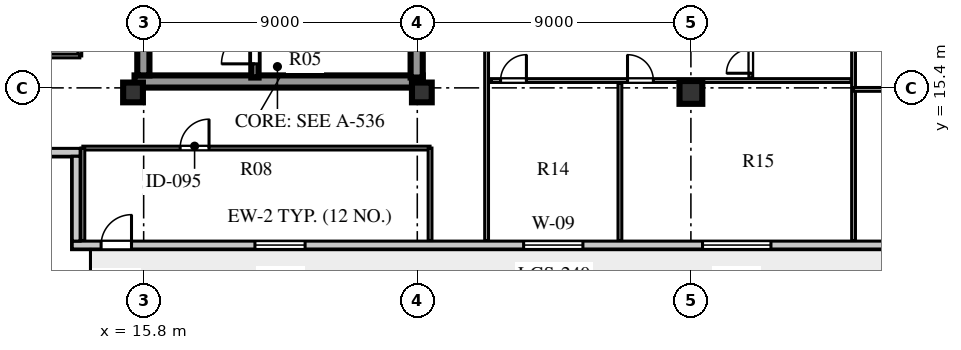
"""IFC4 building model, lengths in metres.
Left out: names, types, materials, properties, quantities, classifications, styles, units other than length and angle.
Written with IfcOpenShell. Run it as: python <this file> out.ifc"""

import sys

from ifc_helpers import new_model, si_unit, direction, frame, frame_2d, origin, origin_2d, place, context, subcontext, project, spatial, rectangle, extrude, element, fill, save


model = new_model("IFC4")
c1 = context("Model", 3, precision=1e-05, world=origin(), true_north=direction((0.0, 1.0)))
c2 = subcontext(c1, "Body", "Model", "MODEL_VIEW")
j1 = project(units=[si_unit("LENGTHUNIT", "METRE"), si_unit("PLANEANGLEUNIT", "RADIAN")], contexts=[c1])
p1 = place(None, origin())
s1 = spatial("IfcSite", under=j1, at=p1, CompositionType="ELEMENT")
p2 = place(p1, origin())
s2 = spatial("IfcBuilding", under=s1, at=p2, CompositionType="ELEMENT")
p3 = place(p2, frame((0.0, 0.0, 280.4)))
s3 = spatial("IfcBuildingStorey", under=s2, at=p3, CompositionType="ELEMENT", Elevation=280.4)
p4 = place(p3, frame((15.5, 15.61, 0.0), z_axis=(0.0, 0.0, 1.0), x_axis=(1.0, 0.0, 0.0)))
e1 = element("IfcWall", 1, at=p4, inside=s3, PredefinedType="SHEAR", context=c2, shape_type="SweptSolid", body=[
    extrude(rectangle(XDim=9.48, YDim=0.4, at=frame_2d((4.74, 0.0))), origin(), (0.0, 0.0, 1.0), 3.66),
])
p5 = place(p3, frame((15.79, 15.81, 0.0), z_axis=(0.0, 0.0, 1.0), x_axis=(0.0, 1.0, 0.0)))
e2 = element("IfcWall", 2, at=p5, inside=s3, PredefinedType="SHEAR", context=c2, shape_type="SweptSolid", body=[
    extrude(rectangle(XDim=25.63, YDim=0.4, at=frame_2d((12.815, 0.0))), origin(), (0.0, 0.0, 1.0), 3.66),
])
p6 = place(p3, frame((24.78, 15.74, 0.0), z_axis=(0.0, 0.0, 1.0), x_axis=(0.0, 1.0, 0.0)))
e3 = element("IfcWall", 3, at=p6, inside=s3, PredefinedType="SHEAR", context=c2, shape_type="SweptSolid", body=[
    extrude(rectangle(XDim=25.76, YDim=0.4, at=frame_2d((12.88, 0.0))), origin(), (0.0, 0.0, 1.0), 3.66),
])
p7 = place(p6, frame((1.61, 0.0, 0.0)))
e4 = element("IfcOpeningElement", 4, at=p7, cuts=e3, PredefinedType="OPENING", context=c2, shape_type="SweptSolid", body=[
    extrude(rectangle(XDim=1.2, YDim=2.1, at=frame_2d((0.6, 1.05))), frame((0.0, 0.21, 0.0), z_axis=(0.0, -1.0, 0.0), x_axis=(1.0, 0.0, 0.0)), (0.0, 0.0, 1.0), 0.42),
])
p8 = place(p6, frame((6.78, 0.0, 0.0)))
e5 = element("IfcOpeningElement", 5, at=p8, cuts=e3, PredefinedType="OPENING", context=c2, shape_type="SweptSolid", body=[
    extrude(rectangle(XDim=0.85, YDim=2.06, at=frame_2d((0.425, 1.03))), frame((0.0, 0.21, 0.0), z_axis=(0.0, -1.0, 0.0), x_axis=(1.0, 0.0, 0.0)), (0.0, 0.0, 1.0), 0.42),
])
p9 = place(p6, frame((12.11, 0.0, 0.0)))
e6 = element("IfcOpeningElement", 6, at=p9, cuts=e3, PredefinedType="OPENING", context=c2, shape_type="SweptSolid", body=[
    extrude(rectangle(XDim=1.5, YDim=2.12, at=frame_2d((0.75, 1.06))), frame((0.0, 0.21, 0.0), z_axis=(0.0, -1.0, 0.0), x_axis=(1.0, 0.0, 0.0)), (0.0, 0.0, 1.0), 0.42),
])
p10 = place(p6, frame((20.11, 0.0, 0.0)))
e7 = element("IfcOpeningElement", 7, at=p10, cuts=e3, PredefinedType="OPENING", context=c2, shape_type="SweptSolid", body=[
    extrude(rectangle(XDim=1.2, YDim=2.12, at=frame_2d((0.6, 1.06))), frame((0.0, 0.21, 0.0), z_axis=(0.0, -1.0, 0.0), x_axis=(1.0, 0.0, 0.0)), (0.0, 0.0, 1.0), 0.42),
])
p11 = place(p6, frame((24.01, 0.0, 0.0)))
e8 = element("IfcOpeningElement", 8, at=p11, cuts=e3, PredefinedType="OPENING", context=c2, shape_type="SweptSolid", body=[
    extrude(rectangle(XDim=0.95, YDim=2.1, at=frame_2d((0.475, 1.05))), frame((0.0, 0.21, 0.0), z_axis=(0.0, -1.0, 0.0), x_axis=(1.0, 0.0, 0.0)), (0.0, 0.0, 1.0), 0.42),
])
for number, where, z_axis, x_axis in (
    (9, (15.45, 15.25, 0.0), (0.0, 0.0, 1.0), (1.0, 0.0, 0.0)),
    (10, (24.95, 15.25, 0.0), (0.0, 0.0, 1.0), (1.0, 0.0, 0.0)),
):
    element("IfcColumn", number, at=place(p3, frame(where, z_axis=z_axis, x_axis=x_axis)), inside=s3, PredefinedType="COLUMN", context=c2, shape_type="SweptSolid", body=[
        extrude(rectangle(XDim=0.65, YDim=0.65, at=origin_2d()), origin(), (0.0, 0.0, 1.0), 3.66),
    ])
p12 = place(p3, frame((33.8, 15.25, 0.0), z_axis=(0.0, 0.0, 1.0), x_axis=(1.0, 0.0, 0.0)))
e11 = element("IfcColumn", 11, at=p12, inside=s3, PredefinedType="COLUMN", context=c2, shape_type="SweptSolid", body=[
    extrude(rectangle(XDim=0.75, YDim=0.75, at=origin_2d()), origin(), (0.0, 0.0, 1.0), 3.66),
])
p13 = place(p3, frame((13.45, 10.23, 0.0), z_axis=(0.0, 0.0, 1.0), x_axis=(1.0, 0.0, 0.0)))
e12 = element("IfcWall", 12, at=p13, inside=s3, PredefinedType="SOLIDWALL", context=c2, shape_type="SweptSolid", body=[
    extrude(rectangle(XDim=31.7, YDim=0.26, at=frame_2d((15.85, 0.0))), origin(), (0.0, 0.0, 1.0), 3.66),
])
p14 = place(p13, frame((0.95, 0.0, 0.0)))
e13 = element("IfcOpeningElement", 13, at=p14, cuts=e12, PredefinedType="OPENING", context=c2, shape_type="SweptSolid", body=[
    extrude(rectangle(XDim=1.0, YDim=2.05, at=frame_2d((0.5, 1.025))), frame((0.0, 0.14, 0.0), z_axis=(0.0, -1.0, 0.0), x_axis=(1.0, 0.0, 0.0)), (0.0, 0.0, 1.0), 0.28),
])
p15 = place(p13, frame((6.01, 0.0, 0.8)))
e14 = element("IfcOpeningElement", 14, at=p15, cuts=e12, PredefinedType="OPENING", context=c2, shape_type="SweptSolid", body=[
    extrude(rectangle(XDim=1.65, YDim=1.95, at=frame_2d((0.825, 0.975))), frame((0.0, 0.14, 0.0), z_axis=(0.0, -1.0, 0.0), x_axis=(1.0, 0.0, 0.0)), (0.0, 0.0, 1.0), 0.28),
])
p16 = place(p13, frame((14.848, 0.0, 0.8)))
e15 = element("IfcOpeningElement", 15, at=p16, cuts=e12, PredefinedType="OPENING", context=c2, shape_type="SweptSolid", body=[
    extrude(rectangle(XDim=1.95, YDim=2.0, at=frame_2d((0.975, 1.0))), frame((0.0, 0.14, 0.0), z_axis=(0.0, -1.0, 0.0), x_axis=(1.0, 0.0, 0.0)), (0.0, 0.0, 1.0), 0.28),
])
p17 = place(p13, frame((20.733, 0.0, 0.8)))
e16 = element("IfcOpeningElement", 16, at=p17, cuts=e12, PredefinedType="OPENING", context=c2, shape_type="SweptSolid", body=[
    extrude(rectangle(XDim=2.25, YDim=2.0, at=frame_2d((1.125, 1.0))), frame((0.0, 0.14, 0.0), z_axis=(0.0, -1.0, 0.0), x_axis=(1.0, 0.0, 0.0)), (0.0, 0.0, 1.0), 0.28),
])
p18 = place(p13, frame((27.745, 0.0, 0.8)))
e17 = element("IfcOpeningElement", 17, at=p18, cuts=e12, PredefinedType="OPENING", context=c2, shape_type="SweptSolid", body=[
    extrude(rectangle(XDim=1.8, YDim=2.0, at=frame_2d((0.9, 1.0))), frame((0.0, 0.14, 0.0), z_axis=(0.0, -1.0, 0.0), x_axis=(1.0, 0.0, 0.0)), (0.0, 0.0, 1.0), 0.28),
])
p19 = place(p3, frame((10.4, 13.28, 0.0), z_axis=(0.0, 0.0, 1.0), x_axis=(1.0, 0.0, 0.0)))
e18 = element("IfcWall", 18, at=p19, inside=s3, PredefinedType="SOLIDWALL", context=c2, shape_type="SweptSolid", body=[
    extrude(rectangle(XDim=3.31, YDim=0.26, at=frame_2d((1.655, 0.0))), origin(), (0.0, 0.0, 1.0), 3.66),
])
p20 = place(p3, frame((13.58, 13.15, 0.0), z_axis=(0.0, 0.0, 1.0), x_axis=(0.0, -1.0, 0.0)))
e19 = element("IfcWall", 19, at=p20, inside=s3, PredefinedType="SOLIDWALL", context=c2, shape_type="SweptSolid", body=[
    extrude(rectangle(XDim=2.79, YDim=0.26, at=frame_2d((1.395, 0.0))), origin(), (0.0, 0.0, 1.0), 3.66),
])
p21 = place(p3, frame((19.46, 15.74, 0.0), z_axis=(0.0, 0.0, 1.0), x_axis=(0.0, 1.0, 0.0)))
e20 = element("IfcWall", 20, at=p21, inside=s3, PredefinedType="SHEAR", context=c2, shape_type="SweptSolid", body=[
    extrude(rectangle(XDim=8.2, YDim=0.24, at=frame_2d((4.1, 0.0))), origin(), (0.0, 0.0, 1.0), 3.9),
])
p22 = place(p21, frame((0.45, 0.0, 0.0)))
e21 = element("IfcOpeningElement", 21, at=p22, cuts=e20, PredefinedType="OPENING", context=c2, shape_type="SweptSolid", body=[
    extrude(rectangle(XDim=1.1, YDim=2.1, at=frame_2d((0.55, 1.05))), frame((0.0, 0.13, 0.0), z_axis=(0.0, -1.0, 0.0), x_axis=(1.0, 0.0, 0.0)), (0.0, 0.0, 1.0), 0.26),
])
p23 = place(p3, frame((27.08, 10.38, 0.0), z_axis=(0.0, 0.0, 1.0), x_axis=(0.0, 1.0, 0.0)))
e22 = element("IfcWall", 22, at=p23, inside=s3, PredefinedType="PLUMBINGWALL", context=c2, shape_type="SweptSolid", body=[
    extrude(rectangle(XDim=11.04, YDim=0.125, at=frame_2d((5.52, 0.0))), origin(), (0.0, 0.0, 1.0), 3.66),
])
p24 = place(p3, frame((13.8, 13.42, 0.0), z_axis=(0.0, 0.0, 1.0), x_axis=(1.0, 0.0, 0.0)))
e23 = element("IfcWall", 23, at=p24, inside=s3, PredefinedType="PLUMBINGWALL", context=c2, shape_type="SweptSolid", body=[
    extrude(rectangle(XDim=11.42, YDim=0.125, at=frame_2d((5.71, 0.0))), origin(), (0.0, 0.0, 1.0), 3.66),
])
p25 = place(p24, frame((3.2, 0.0, 0.0)))
e24 = element("IfcOpeningElement", 24, at=p25, cuts=e23, PredefinedType="OPENING", context=c2, shape_type="SweptSolid", body=[
    extrude(rectangle(XDim=0.95, YDim=2.08, at=frame_2d((0.475, 1.04))), frame((0.0, 0.073, 0.0), z_axis=(0.0, -1.0, 0.0), x_axis=(1.0, 0.0, 0.0)), (0.0, 0.0, 1.0), 0.145),
])
p26 = place(p3, frame((13.8, 10.38, 0.0), z_axis=(0.0, 0.0, 1.0), x_axis=(0.0, 1.0, 0.0)))
e25 = element("IfcWall", 25, at=p26, inside=s3, PredefinedType="PLUMBINGWALL", context=c2, shape_type="SweptSolid", body=[
    extrude(rectangle(XDim=3.04, YDim=0.125, at=frame_2d((1.52, 0.0))), origin(), (0.0, 0.0, 1.0), 3.66),
])
p27 = place(p3, frame((25.22, 10.38, 0.0), z_axis=(0.0, 0.0, 1.0), x_axis=(0.0, 1.0, 0.0)))
e26 = element("IfcWall", 26, at=p27, inside=s3, PredefinedType="PLUMBINGWALL", context=c2, shape_type="SweptSolid", body=[
    extrude(rectangle(XDim=3.04, YDim=0.125, at=frame_2d((1.52, 0.0))), origin(), (0.0, 0.0, 1.0), 3.21),
])
p28 = place(p3, frame((13.7, 16.45, 0.0), z_axis=(0.0, 0.0, 1.0), x_axis=(0.0, 1.0, 0.0)))
e27 = element("IfcWall", 27, at=p28, inside=s3, PredefinedType="PLUMBINGWALL", context=c2, shape_type="SweptSolid", body=[
    extrude(rectangle(XDim=24.3, YDim=0.125, at=frame_2d((12.15, 0.0))), origin(), (0.0, 0.0, 1.0), 3.66),
])
p29 = place(p28, frame((5.1, 0.0, 0.0)))
e28 = element("IfcOpeningElement", 28, at=p29, cuts=e27, PredefinedType="OPENING", context=c2, shape_type="SweptSolid", body=[
    extrude(rectangle(XDim=0.95, YDim=2.08, at=frame_2d((0.475, 1.04))), frame((0.0, 0.073, 0.0), z_axis=(0.0, -1.0, 0.0), x_axis=(1.0, 0.0, 0.0)), (0.0, 0.0, 1.0), 0.145),
])
p30 = place(p3, frame((10.68, 16.45, 0.0), z_axis=(0.0, 0.0, 1.0), x_axis=(1.0, 0.0, 0.0)))
e29 = element("IfcWall", 29, at=p30, inside=s3, PredefinedType="PLUMBINGWALL", context=c2, shape_type="SweptSolid", body=[
    extrude(rectangle(XDim=3.02, YDim=0.125, at=frame_2d((1.51, 0.0))), origin(), (0.0, 0.0, 1.0), 3.66),
])
p31 = place(p3, frame((39.15, 10.38, 0.0), z_axis=(0.0, 0.0, 1.0), x_axis=(0.0, 1.0, 0.0)))
e30 = element("IfcWall", 30, at=p31, inside=s3, PredefinedType="PLUMBINGWALL", context=c2, shape_type="SweptSolid", body=[
    extrude(rectangle(XDim=11.04, YDim=0.125, at=frame_2d((5.52, 0.0))), origin(), (0.0, 0.0, 1.0), 3.66),
])
p32 = place(p3, frame((27.24, 15.641, 0.0), z_axis=(0.0, 0.0, 1.0), x_axis=(1.0, 0.0, 0.0)))
e31 = element("IfcWall", 31, at=p32, inside=s3, PredefinedType="PLUMBINGWALL", context=c2, shape_type="SweptSolid", body=[
    extrude(rectangle(XDim=11.83, YDim=0.125, at=frame_2d((5.915, 0.0))), origin(), (0.0, 0.0, 1.0), 3.66),
])
p33 = place(p32, frame((0.3, 0.0, 0.0)))
e32 = element("IfcOpeningElement", 32, at=p33, cuts=e31, PredefinedType="OPENING", context=c2, shape_type="SweptSolid", body=[
    extrude(rectangle(XDim=0.85, YDim=2.08, at=frame_2d((0.425, 1.04))), frame((0.0, 0.073, 0.0), z_axis=(0.0, -1.0, 0.0), x_axis=(1.0, 0.0, 0.0)), (0.0, 0.0, 1.0), 0.145),
])
p34 = place(p32, frame((4.475, 0.0, 0.0)))
e33 = element("IfcOpeningElement", 33, at=p34, cuts=e31, PredefinedType="OPENING", context=c2, shape_type="SweptSolid", body=[
    extrude(rectangle(XDim=0.85, YDim=2.08, at=frame_2d((0.425, 1.04))), frame((0.0, 0.073, 0.0), z_axis=(0.0, -1.0, 0.0), x_axis=(1.0, 0.0, 0.0)), (0.0, 0.0, 1.0), 0.145),
])
p35 = place(p3, frame((35.77, 15.721, 0.0), z_axis=(0.0, 0.0, 1.0), x_axis=(0.0, 1.0, 0.0)))
e34 = element("IfcWall", 34, at=p35, inside=s3, PredefinedType="PLUMBINGWALL", context=c2, shape_type="SweptSolid", body=[
    extrude(rectangle(XDim=5.619, YDim=0.125, at=frame_2d((2.81, 0.0))), origin(), (0.0, 0.0, 1.0), 3.66),
])
p36 = place(p35, frame((0.16, 0.0, 0.0)))
e35 = element("IfcOpeningElement", 35, at=p36, cuts=e34, PredefinedType="OPENING", context=c2, shape_type="SweptSolid", body=[
    extrude(rectangle(XDim=0.8, YDim=2.05, at=frame_2d((0.4, 1.025))), frame((0.0, 0.073, 0.0), z_axis=(0.0, -1.0, 0.0), x_axis=(1.0, 0.0, 0.0)), (0.0, 0.0, 1.0), 0.145),
])
p37 = place(p35, frame((2.977, 0.0, 0.0)))
e36 = element("IfcOpeningElement", 36, at=p37, cuts=e34, PredefinedType="OPENING", context=c2, shape_type="SweptSolid", body=[
    extrude(rectangle(XDim=0.85, YDim=2.08, at=frame_2d((0.425, 1.04))), frame((0.0, 0.073, 0.0), z_axis=(0.0, -1.0, 0.0), x_axis=(1.0, 0.0, 0.0)), (0.0, 0.0, 1.0), 0.145),
])
p38 = place(p3, frame((31.465, 10.38, 0.0), z_axis=(0.0, 0.0, 1.0), x_axis=(0.0, 1.0, 0.0)))
e37 = element("IfcWall", 37, at=p38, inside=s3, PredefinedType="PLUMBINGWALL", context=c2, shape_type="SweptSolid", body=[
    extrude(rectangle(XDim=5.181, YDim=0.125, at=frame_2d((2.591, 0.0))), origin(), (0.0, 0.0, 1.0), 3.66),
])
p39 = place(p3, frame((39.15, 15.35, 0.0), z_axis=(0.0, 0.0, 1.0), x_axis=(1.0, 0.0, 0.0)))
e38 = element("IfcWall", 38, at=p39, inside=s3, PredefinedType="PLUMBINGWALL", context=c2, shape_type="SweptSolid", body=[
    extrude(rectangle(XDim=8.77, YDim=0.125, at=frame_2d((4.385, 0.0))), origin(), (0.0, 0.0, 1.0), 3.06),
])
p40 = place(p14, frame((1.0, 0.0, 0.0), z_axis=(0.0, 0.0, 1.0), x_axis=(-1.0, 0.0, 0.0)))
e39 = element("IfcDoor", 39, at=p40, inside=s3, OperationType="SINGLE_SWING_LEFT", PredefinedType="DOOR", context=c2, shape_type="SweptSolid", body=[
    extrude(rectangle(XDim=1.0, YDim=2.05, at=frame_2d((0.5, 1.025))), frame((0.0, 0.025, 0.0), z_axis=(0.0, -1.0, 0.0), x_axis=(1.0, 0.0, 0.0)), (0.0, 0.0, 1.0), 0.05),
])
fill(e13, e39)
p41 = place(p15, origin())
e40 = element("IfcWindow", 40, at=p41, inside=s3, PartitioningType="SINGLE_PANEL", PredefinedType="WINDOW", context=c2, shape_type="SweptSolid", body=[
    extrude(rectangle(XDim=1.65, YDim=1.95, at=frame_2d((0.825, 0.975))), frame((0.0, 0.03, 0.0), z_axis=(0.0, -1.0, 0.0), x_axis=(1.0, 0.0, 0.0)), (0.0, 0.0, 1.0), 0.06),
])
fill(e14, e40)
p42 = place(p16, origin())
e41 = element("IfcWindow", 41, at=p42, inside=s3, PartitioningType="SINGLE_PANEL", PredefinedType="WINDOW", context=c2, shape_type="SweptSolid", body=[
    extrude(rectangle(XDim=1.95, YDim=2.0, at=frame_2d((0.975, 1.0))), frame((0.0, 0.03, 0.0), z_axis=(0.0, -1.0, 0.0), x_axis=(1.0, 0.0, 0.0)), (0.0, 0.0, 1.0), 0.06),
])
fill(e15, e41)
p43 = place(p17, origin())
e42 = element("IfcWindow", 42, at=p43, inside=s3, PartitioningType="SINGLE_PANEL", PredefinedType="WINDOW", context=c2, shape_type="SweptSolid", body=[
    extrude(rectangle(XDim=2.25, YDim=2.0, at=frame_2d((1.125, 1.0))), frame((0.0, 0.03, 0.0), z_axis=(0.0, -1.0, 0.0), x_axis=(1.0, 0.0, 0.0)), (0.0, 0.0, 1.0), 0.06),
])
fill(e16, e42)
p44 = place(p22, origin())
e43 = element("IfcDoor", 43, at=p44, inside=s3, OperationType="SINGLE_SWING_LEFT", PredefinedType="DOOR", context=c2, shape_type="SweptSolid", body=[
    extrude(rectangle(XDim=1.1, YDim=2.1, at=frame_2d((0.55, 1.05))), frame((0.0, 0.025, 0.0), z_axis=(0.0, -1.0, 0.0), x_axis=(1.0, 0.0, 0.0)), (0.0, 0.0, 1.0), 0.05),
])
fill(e21, e43)
p45 = place(p25, frame((0.95, 0.0, 0.0), z_axis=(0.0, 0.0, 1.0), x_axis=(-1.0, 0.0, 0.0)))
e44 = element("IfcDoor", 44, at=p45, inside=s3, OperationType="SINGLE_SWING_LEFT", PredefinedType="DOOR", context=c2, shape_type="SweptSolid", body=[
    extrude(rectangle(XDim=0.95, YDim=2.08, at=frame_2d((0.475, 1.04))), frame((0.0, 0.025, 0.0), z_axis=(0.0, -1.0, 0.0), x_axis=(1.0, 0.0, 0.0)), (0.0, 0.0, 1.0), 0.05),
])
fill(e24, e44)
p46 = place(p36, origin())
e45 = element("IfcDoor", 45, at=p46, inside=s3, OperationType="SINGLE_SWING_LEFT", PredefinedType="DOOR", context=c2, shape_type="SweptSolid", body=[
    extrude(rectangle(XDim=0.8, YDim=2.05, at=frame_2d((0.4, 1.025))), frame((0.0, 0.025, 0.0), z_axis=(0.0, -1.0, 0.0), x_axis=(1.0, 0.0, 0.0)), (0.0, 0.0, 1.0), 0.05),
])
fill(e35, e45)
p47 = place(p33, frame((0.85, 0.0, 0.0), z_axis=(0.0, 0.0, 1.0), x_axis=(-1.0, 0.0, 0.0)))
e46 = element("IfcDoor", 46, at=p47, inside=s3, OperationType="SINGLE_SWING_LEFT", PredefinedType="DOOR", context=c2, shape_type="SweptSolid", body=[
    extrude(rectangle(XDim=0.85, YDim=2.08, at=frame_2d((0.425, 1.04))), frame((0.0, 0.025, 0.0), z_axis=(0.0, -1.0, 0.0), x_axis=(1.0, 0.0, 0.0)), (0.0, 0.0, 1.0), 0.05),
])
fill(e32, e46)
p48 = place(p34, frame((0.85, 0.0, 0.0), z_axis=(0.0, 0.0, 1.0), x_axis=(-1.0, 0.0, 0.0)))
e47 = element("IfcDoor", 47, at=p48, inside=s3, OperationType="SINGLE_SWING_RIGHT", PredefinedType="DOOR", context=c2, shape_type="SweptSolid", body=[
    extrude(rectangle(XDim=0.85, YDim=2.08, at=frame_2d((0.425, 1.04))), frame((0.0, 0.025, 0.0), z_axis=(0.0, -1.0, 0.0), x_axis=(1.0, 0.0, 0.0)), (0.0, 0.0, 1.0), 0.05),
])
fill(e33, e47)
save(model, sys.argv[1])
